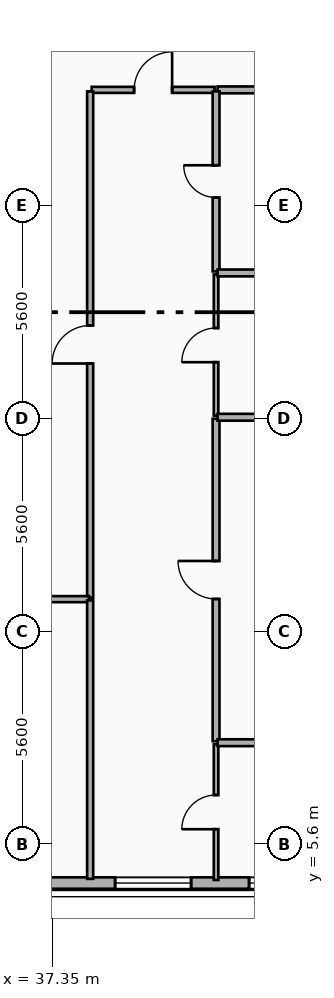
"""IFC4 building model, lengths in metres.
Left out: names, types, materials, properties, quantities, classifications, styles, units other than length and angle.
Written with IfcOpenShell. Run it as: python <this file> out.ifc"""

import sys

from ifc_helpers import new_model, si_unit, direction, frame, frame_2d, origin, place, context, subcontext, project, spatial, rectangle, extrude, element, fill, save


model = new_model("IFC4")
c1 = context("Model", 3, precision=1e-05, world=origin(), true_north=direction((0.0, 1.0)))
c2 = subcontext(c1, "Body", "Model", "MODEL_VIEW")
j1 = project(units=[si_unit("LENGTHUNIT", "METRE"), si_unit("PLANEANGLEUNIT", "RADIAN")], contexts=[c1])
p1 = place(None, origin())
s1 = spatial("IfcSite", under=j1, at=p1, CompositionType="ELEMENT")
p2 = place(p1, origin())
s2 = spatial("IfcBuilding", under=s1, at=p2, CompositionType="ELEMENT")
p3 = place(p2, frame((0.0, 0.0, 193.2)))
s3 = spatial("IfcBuildingStorey", under=s2, at=p3, CompositionType="ELEMENT", Elevation=193.2)
p4 = place(p3, frame((48.0, 4.58, 0.0), z_axis=(0.0, 0.0, 1.0), x_axis=(-1.0, 0.0, 0.0)))
e1 = element("IfcWall", 1, at=p4, inside=s3, PredefinedType="SOLIDWALL", context=c2, shape_type="SweptSolid", body=[
    extrude(rectangle(XDim=38.4, YDim=0.3, at=frame_2d((19.2, 0.0))), origin(), (0.0, 0.0, 1.0), 3.34),
])
p5 = place(p4, frame((36.19, 0.0, 0.8)))
e2 = element("IfcOpeningElement", 2, at=p5, cuts=e1, PredefinedType="OPENING", context=c2, shape_type="SweptSolid", body=[
    extrude(rectangle(XDim=1.8, YDim=1.8, at=frame_2d((0.9, 0.9))), frame((0.0, 0.16, 0.0), z_axis=(0.0, -1.0, 0.0), x_axis=(1.0, 0.0, 0.0)), (0.0, 0.0, 1.0), 0.32),
])
p6 = place(p4, frame((29.712, 0.0, 0.7)))
e3 = element("IfcOpeningElement", 3, at=p6, cuts=e1, PredefinedType="OPENING", context=c2, shape_type="SweptSolid", body=[
    extrude(rectangle(XDim=2.0, YDim=2.2, at=frame_2d((1.0, 1.1))), frame((0.0, 0.16, 0.0), z_axis=(0.0, -1.0, 0.0), x_axis=(1.0, 0.0, 0.0)), (0.0, 0.0, 1.0), 0.32),
])
p7 = place(p4, frame((33.038, 0.0, 0.7)))
e4 = element("IfcOpeningElement", 4, at=p7, cuts=e1, PredefinedType="OPENING", context=c2, shape_type="SweptSolid", body=[
    extrude(rectangle(XDim=2.0, YDim=2.2, at=frame_2d((1.0, 1.1))), frame((0.0, 0.16, 0.0), z_axis=(0.0, -1.0, 0.0), x_axis=(1.0, 0.0, 0.0)), (0.0, 0.0, 1.0), 0.32),
])
p8 = place(p4, frame((20.0, 0.0, 0.7)))
e5 = element("IfcOpeningElement", 5, at=p8, cuts=e1, PredefinedType="OPENING", context=c2, shape_type="SweptSolid", body=[
    extrude(rectangle(XDim=2.0, YDim=2.2, at=frame_2d((1.0, 1.1))), frame((0.0, 0.16, 0.0), z_axis=(0.0, -1.0, 0.0), x_axis=(1.0, 0.0, 0.0)), (0.0, 0.0, 1.0), 0.32),
])
p9 = place(p4, frame((25.2, 0.0, 0.7)))
e6 = element("IfcOpeningElement", 6, at=p9, cuts=e1, PredefinedType="OPENING", context=c2, shape_type="SweptSolid", body=[
    extrude(rectangle(XDim=2.0, YDim=2.2, at=frame_2d((1.0, 1.1))), frame((0.0, 0.16, 0.0), z_axis=(0.0, -1.0, 0.0), x_axis=(1.0, 0.0, 0.0)), (0.0, 0.0, 1.0), 0.32),
])
p10 = place(p4, frame((13.4, 0.0, 0.7)))
e7 = element("IfcOpeningElement", 7, at=p10, cuts=e1, PredefinedType="OPENING", context=c2, shape_type="SweptSolid", body=[
    extrude(rectangle(XDim=2.0, YDim=2.2, at=frame_2d((1.0, 1.1))), frame((0.0, 0.16, 0.0), z_axis=(0.0, -1.0, 0.0), x_axis=(1.0, 0.0, 0.0)), (0.0, 0.0, 1.0), 0.32),
])
p11 = place(p4, frame((6.993, 0.0, 0.7)))
e8 = element("IfcOpeningElement", 8, at=p11, cuts=e1, PredefinedType="OPENING", context=c2, shape_type="SweptSolid", body=[
    extrude(rectangle(XDim=2.0, YDim=2.2, at=frame_2d((1.0, 1.1))), frame((0.0, 0.16, 0.0), z_axis=(0.0, -1.0, 0.0), x_axis=(1.0, 0.0, 0.0)), (0.0, 0.0, 1.0), 0.32),
])
p12 = place(p4, frame((3.469, 0.0, 0.7)))
e9 = element("IfcOpeningElement", 9, at=p12, cuts=e1, PredefinedType="OPENING", context=c2, shape_type="SweptSolid", body=[
    extrude(rectangle(XDim=2.0, YDim=2.2, at=frame_2d((1.0, 1.1))), frame((0.0, 0.16, 0.0), z_axis=(0.0, -1.0, 0.0), x_axis=(1.0, 0.0, 0.0)), (0.0, 0.0, 1.0), 0.32),
])
p13 = place(p4, frame((0.41, 0.0, 0.8)))
e10 = element("IfcOpeningElement", 10, at=p13, cuts=e1, PredefinedType="OPENING", context=c2, shape_type="SweptSolid", body=[
    extrude(rectangle(XDim=1.8, YDim=1.8, at=frame_2d((0.9, 0.9))), frame((0.0, 0.16, 0.0), z_axis=(0.0, -1.0, 0.0), x_axis=(1.0, 0.0, 0.0)), (0.0, 0.0, 1.0), 0.32),
])
p14 = place(p3, frame((38.39, 25.45, 0.0), z_axis=(0.0, 0.0, 1.0), x_axis=(1.0, 0.0, 0.0)))
e11 = element("IfcWall", 11, at=p14, inside=s3, PredefinedType="PARTITIONING", context=c2, shape_type="SweptSolid", body=[
    extrude(rectangle(XDim=3.233, YDim=0.16, at=frame_2d((1.617, 0.0))), origin(), (0.0, 0.0, 1.0), 3.34),
])
p15 = place(p14, frame((1.116, 0.0, 0.0)))
e12 = element("IfcOpeningElement", 12, at=p15, cuts=e11, PredefinedType="OPENING", context=c2, shape_type="SweptSolid", body=[
    extrude(rectangle(XDim=1.0, YDim=2.15, at=frame_2d((0.5, 1.075))), frame((0.0, 0.09, 0.0), z_axis=(0.0, -1.0, 0.0), x_axis=(1.0, 0.0, 0.0)), (0.0, 0.0, 1.0), 0.18),
])
p16 = place(p3, frame((41.703, 25.45, 0.0), z_axis=(0.0, 0.0, 1.0), x_axis=(1.0, 0.0, 0.0)))
e13 = element("IfcWall", 13, at=p16, inside=s3, PredefinedType="PLUMBINGWALL", context=c2, shape_type="SweptSolid", body=[
    extrude(rectangle(XDim=3.657, YDim=0.18, at=frame_2d((1.829, 0.0))), origin(), (0.0, 0.0, 1.0), 2.42),
])
p17 = place(p3, frame((38.35, 12.09, 0.0), z_axis=(0.0, 0.0, 1.0), x_axis=(0.0, 1.0, 0.0)))
e14 = element("IfcWall", 14, at=p17, inside=s3, PredefinedType="PARTITIONING", context=c2, shape_type="SweptSolid", body=[
    extrude(rectangle(XDim=13.32, YDim=0.16, at=frame_2d((6.66, 0.0))), origin(), (0.0, 0.0, 1.0), 2.87),
])
p18 = place(p17, frame((6.16, 0.0, 0.0)))
e15 = element("IfcOpeningElement", 15, at=p18, cuts=e14, PredefinedType="OPENING", context=c2, shape_type="SweptSolid", body=[
    extrude(rectangle(XDim=1.0, YDim=2.15, at=frame_2d((0.5, 1.075))), frame((0.0, 0.09, 0.0), z_axis=(0.0, -1.0, 0.0), x_axis=(1.0, 0.0, 0.0)), (0.0, 0.0, 1.0), 0.18),
])
p19 = place(p3, frame((41.663, 4.66, 0.0), z_axis=(0.0, 0.0, 1.0), x_axis=(0.0, 1.0, 0.0)))
e16 = element("IfcWall", 16, at=p19, inside=s3, PredefinedType="PARTITIONING", context=c2, shape_type="SweptSolid", body=[
    extrude(rectangle(XDim=3.573, YDim=0.12, at=frame_2d((1.787, 0.0))), origin(), (0.0, 0.0, 1.0), 3.0),
])
p20 = place(p19, frame((1.336, 0.0, 0.0)))
e17 = element("IfcOpeningElement", 17, at=p20, cuts=e16, PredefinedType="OPENING", context=c2, shape_type="SweptSolid", body=[
    extrude(rectangle(XDim=0.9, YDim=2.1, at=frame_2d((0.45, 1.05))), frame((0.0, 0.07, 0.0), z_axis=(0.0, -1.0, 0.0), x_axis=(1.0, 0.0, 0.0)), (0.0, 0.0, 1.0), 0.14),
])
p21 = place(p3, frame((41.663, 8.313, 0.0), z_axis=(0.0, 0.0, 1.0), x_axis=(0.0, 1.0, 0.0)))
e18 = element("IfcWall", 18, at=p21, inside=s3, PredefinedType="PLUMBINGWALL", context=c2, shape_type="SweptSolid", body=[
    extrude(rectangle(XDim=8.483, YDim=0.18, at=frame_2d((4.241, 0.0))), origin(), (0.0, 0.0, 1.0), 2.87),
])
p22 = place(p21, frame((3.741, 0.0, 0.0)))
e19 = element("IfcOpeningElement", 19, at=p22, cuts=e18, PredefinedType="OPENING", context=c2, shape_type="SweptSolid", body=[
    extrude(rectangle(XDim=1.0, YDim=2.15, at=frame_2d((0.5, 1.075))), frame((0.0, 0.1, 0.0), z_axis=(0.0, -1.0, 0.0), x_axis=(1.0, 0.0, 0.0)), (0.0, 0.0, 1.0), 0.2),
])
p23 = place(p3, frame((41.663, 16.876, 0.0), z_axis=(0.0, 0.0, 1.0), x_axis=(0.0, 1.0, 0.0)))
e20 = element("IfcWall", 20, at=p23, inside=s3, PredefinedType="PARTITIONING", context=c2, shape_type="SweptSolid", body=[
    extrude(rectangle(XDim=3.717, YDim=0.12, at=frame_2d((1.858, 0.0))), origin(), (0.0, 0.0, 1.0), 2.87),
])
p24 = place(p23, frame((1.408, 0.0, 0.0)))
e21 = element("IfcOpeningElement", 21, at=p24, cuts=e20, PredefinedType="OPENING", context=c2, shape_type="SweptSolid", body=[
    extrude(rectangle(XDim=0.9, YDim=2.1, at=frame_2d((0.45, 1.05))), frame((0.0, 0.07, 0.0), z_axis=(0.0, -1.0, 0.0), x_axis=(1.0, 0.0, 0.0)), (0.0, 0.0, 1.0), 0.14),
])
p25 = place(p3, frame((41.663, 20.673, 0.0), z_axis=(0.0, 0.0, 1.0), x_axis=(0.0, 1.0, 0.0)))
e22 = element("IfcWall", 22, at=p25, inside=s3, PredefinedType="PLUMBINGWALL", context=c2, shape_type="SweptSolid", body=[
    extrude(rectangle(XDim=4.737, YDim=0.18, at=frame_2d((2.368, 0.0))), origin(), (0.0, 0.0, 1.0), 2.88),
])
p26 = place(p25, frame((1.944, 0.0, 0.0)))
e23 = element("IfcOpeningElement", 23, at=p26, cuts=e22, PredefinedType="OPENING", context=c2, shape_type="SweptSolid", body=[
    extrude(rectangle(XDim=0.85, YDim=2.1, at=frame_2d((0.425, 1.05))), frame((0.0, 0.1, 0.0), z_axis=(0.0, -1.0, 0.0), x_axis=(1.0, 0.0, 0.0)), (0.0, 0.0, 1.0), 0.2),
])
for number, where, z_axis, x_axis in (
    (24, (41.703, 8.273, 0.0), (0.0, 0.0, 1.0), (1.0, 0.0, 0.0)),
    (25, (41.703, 16.836, 0.0), (0.0, 0.0, 1.0), (1.0, 0.0, 0.0)),
    (26, (41.703, 20.633, 0.0), (0.0, 0.0, 1.0), (1.0, 0.0, 0.0)),
):
    element("IfcWall", number, at=place(p3, frame(where, z_axis=z_axis, x_axis=x_axis)), inside=s3, PredefinedType="PLUMBINGWALL", context=c2, shape_type="SweptSolid", body=[
        extrude(rectangle(XDim=3.657, YDim=0.18, at=frame_2d((1.829, 0.0))), origin(), (0.0, 0.0, 1.0), 2.42),
    ])
p27 = place(p3, frame((36.38, 12.05, 0.0), z_axis=(0.0, 0.0, 1.0), x_axis=(1.0, 0.0, 0.0)))
e27 = element("IfcWall", 27, at=p27, inside=s3, PredefinedType="PARTITIONING", context=c2, shape_type="SweptSolid", body=[
    extrude(rectangle(XDim=1.94, YDim=0.16, at=frame_2d((0.97, 0.0))), origin(), (0.0, 0.0, 1.0), 2.42),
])
p28 = place(p3, frame((38.35, 4.69, 0.0), z_axis=(0.0, 0.0, 1.0), x_axis=(0.0, 1.0, 0.0)))
e28 = element("IfcWall", 28, at=p28, inside=s3, PredefinedType="PARTITIONING", context=c2, shape_type="SweptSolid", body=[
    extrude(rectangle(XDim=7.33, YDim=0.16, at=frame_2d((3.665, 0.0))), origin(), (0.0, 0.0, 1.0), 2.87),
])
p29 = place(p11, origin())
e29 = element("IfcWindow", 29, at=p29, inside=s3, PartitioningType="SINGLE_PANEL", PredefinedType="WINDOW", context=c2, shape_type="SweptSolid", body=[
    extrude(rectangle(XDim=2.0, YDim=2.2, at=frame_2d((1.0, 1.1))), frame((0.0, 0.03, 0.0), z_axis=(0.0, -1.0, 0.0), x_axis=(1.0, 0.0, 0.0)), (0.0, 0.0, 1.0), 0.06),
])
fill(e8, e29)
p30 = place(p12, origin())
e30 = element("IfcWindow", 30, at=p30, inside=s3, PartitioningType="SINGLE_PANEL", PredefinedType="WINDOW", context=c2, shape_type="SweptSolid", body=[
    extrude(rectangle(XDim=2.0, YDim=2.2, at=frame_2d((1.0, 1.1))), frame((0.0, 0.03, 0.0), z_axis=(0.0, -1.0, 0.0), x_axis=(1.0, 0.0, 0.0)), (0.0, 0.0, 1.0), 0.06),
])
fill(e9, e30)
p31 = place(p15, origin())
e31 = element("IfcDoor", 31, at=p31, inside=s3, OperationType="SINGLE_SWING_RIGHT", PredefinedType="DOOR", context=c2, shape_type="SweptSolid", body=[
    extrude(rectangle(XDim=1.0, YDim=2.15, at=frame_2d((0.5, 1.075))), frame((0.0, 0.025, 0.0), z_axis=(0.0, -1.0, 0.0), x_axis=(1.0, 0.0, 0.0)), (0.0, 0.0, 1.0), 0.05),
])
fill(e12, e31)
p32 = place(p18, origin())
e32 = element("IfcDoor", 32, at=p32, inside=s3, OperationType="SINGLE_SWING_LEFT", PredefinedType="DOOR", context=c2, shape_type="SweptSolid", body=[
    extrude(rectangle(XDim=1.0, YDim=2.15, at=frame_2d((0.5, 1.075))), frame((0.0, 0.025, 0.0), z_axis=(0.0, -1.0, 0.0), x_axis=(1.0, 0.0, 0.0)), (0.0, 0.0, 1.0), 0.05),
])
fill(e15, e32)
p33 = place(p20, origin())
e33 = element("IfcDoor", 33, at=p33, inside=s3, OperationType="SINGLE_SWING_LEFT", PredefinedType="DOOR", context=c2, shape_type="SweptSolid", body=[
    extrude(rectangle(XDim=0.9, YDim=2.1, at=frame_2d((0.45, 1.05))), frame((0.0, 0.025, 0.0), z_axis=(0.0, -1.0, 0.0), x_axis=(1.0, 0.0, 0.0)), (0.0, 0.0, 1.0), 0.05),
])
fill(e17, e33)
p34 = place(p22, origin())
e34 = element("IfcDoor", 34, at=p34, inside=s3, OperationType="SINGLE_SWING_RIGHT", PredefinedType="DOOR", context=c2, shape_type="SweptSolid", body=[
    extrude(rectangle(XDim=1.0, YDim=2.15, at=frame_2d((0.5, 1.075))), frame((0.0, 0.025, 0.0), z_axis=(0.0, -1.0, 0.0), x_axis=(1.0, 0.0, 0.0)), (0.0, 0.0, 1.0), 0.05),
])
fill(e19, e34)
p35 = place(p24, origin())
e35 = element("IfcDoor", 35, at=p35, inside=s3, OperationType="SINGLE_SWING_LEFT", PredefinedType="DOOR", context=c2, shape_type="SweptSolid", body=[
    extrude(rectangle(XDim=0.9, YDim=2.1, at=frame_2d((0.45, 1.05))), frame((0.0, 0.025, 0.0), z_axis=(0.0, -1.0, 0.0), x_axis=(1.0, 0.0, 0.0)), (0.0, 0.0, 1.0), 0.05),
])
fill(e21, e35)
p36 = place(p26, origin())
e36 = element("IfcDoor", 36, at=p36, inside=s3, OperationType="SINGLE_SWING_RIGHT", PredefinedType="DOOR", context=c2, shape_type="SweptSolid", body=[
    extrude(rectangle(XDim=0.85, YDim=2.1, at=frame_2d((0.425, 1.05))), frame((0.0, 0.025, 0.0), z_axis=(0.0, -1.0, 0.0), x_axis=(1.0, 0.0, 0.0)), (0.0, 0.0, 1.0), 0.05),
])
fill(e23, e36)
save(model, sys.argv[1])
